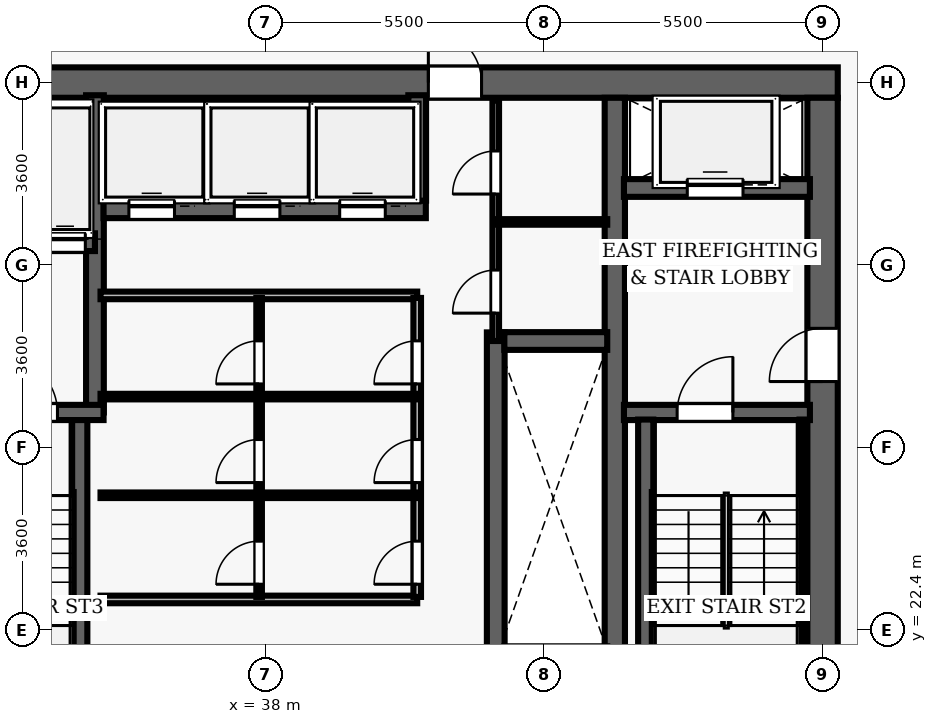
"""IFC4 building model, lengths in metres.
Left out: names, types, materials, properties, quantities, classifications, styles, units other than length and angle.
Written with IfcOpenShell. Run it as: python <this file> out.ifc"""

import sys

from ifc_helpers import new_model, si_unit, direction, frame, frame_2d, origin, place, context, subcontext, project, spatial, rectangle, extrude, element, fill, save


model = new_model("IFC4")
c1 = context("Model", 3, precision=1e-05, world=origin(), true_north=direction((0.0, 1.0)))
c2 = subcontext(c1, "Body", "Model", "MODEL_VIEW")
j1 = project(units=[si_unit("LENGTHUNIT", "METRE"), si_unit("PLANEANGLEUNIT", "RADIAN")], contexts=[c1])
p1 = place(None, origin())
s1 = spatial("IfcSite", under=j1, at=p1, CompositionType="ELEMENT")
p2 = place(p1, origin())
s2 = spatial("IfcBuilding", under=s1, at=p2, CompositionType="ELEMENT")
p3 = place(p2, frame((0.0, 0.0, 48.4)))
s3 = spatial("IfcBuildingStorey", under=s2, at=p3, CompositionType="ELEMENT", Elevation=48.4)
p4 = place(p3, frame((26.7, 33.2, 0.0), z_axis=(0.0, 0.0, 1.0), x_axis=(1.0, 0.0, 0.0)))
e1 = element("IfcWall", 1, at=p4, inside=s3, PredefinedType="SHEAR", context=c2, shape_type="SweptSolid", body=[
    extrude(rectangle(XDim=22.6, YDim=0.6, at=frame_2d((11.3, 0.0))), origin(), (0.0, 0.0, 1.0), 3.5),
])
p5 = place(p4, frame((4.62, 0.0, 0.0)))
e2 = element("IfcOpeningElement", 2, at=p5, cuts=e1, PredefinedType="OPENING", context=c2, shape_type="SweptSolid", body=[
    extrude(rectangle(XDim=1.05, YDim=2.15, at=frame_2d((0.525, 1.075))), frame((0.0, 0.31, 0.0), z_axis=(0.0, -1.0, 0.0), x_axis=(1.0, 0.0, 0.0)), (0.0, 0.0, 1.0), 0.62),
])
p6 = place(p4, frame((14.52, 0.0, 0.0)))
e3 = element("IfcOpeningElement", 3, at=p6, cuts=e1, PredefinedType="OPENING", context=c2, shape_type="SweptSolid", body=[
    extrude(rectangle(XDim=1.05, YDim=2.15, at=frame_2d((0.525, 1.075))), frame((0.0, 0.31, 0.0), z_axis=(0.0, -1.0, 0.0), x_axis=(1.0, 0.0, 0.0)), (0.0, 0.0, 1.0), 0.62),
])
p7 = place(p3, frame((49.0, 19.1, 0.0), z_axis=(0.0, 0.0, 1.0), x_axis=(0.0, 1.0, 0.0)))
e4 = element("IfcWall", 4, at=p7, inside=s3, PredefinedType="SHEAR", context=c2, shape_type="SweptSolid", body=[
    extrude(rectangle(XDim=13.8, YDim=0.6, at=frame_2d((6.9, 0.0))), origin(), (0.0, 0.0, 1.0), 3.5),
])
p8 = place(p7, frame((8.2, 0.0, 0.0)))
e5 = element("IfcOpeningElement", 5, at=p8, cuts=e4, PredefinedType="OPENING", context=c2, shape_type="SweptSolid", body=[
    extrude(rectangle(XDim=1.05, YDim=2.15, at=frame_2d((0.525, 1.075))), frame((0.0, 0.31, 0.0), z_axis=(0.0, -1.0, 0.0), x_axis=(1.0, 0.0, 0.0)), (0.0, 0.0, 1.0), 0.62),
])
p9 = place(p3, frame((44.9, 19.1, 0.0), z_axis=(0.0, 0.0, 1.0), x_axis=(0.0, 1.0, 0.0)))
e6 = element("IfcWall", 6, at=p9, inside=s3, PredefinedType="SHEAR", context=c2, shape_type="SweptSolid", body=[
    extrude(rectangle(XDim=13.8, YDim=0.4, at=frame_2d((6.9, 0.0))), origin(), (0.0, 0.0, 1.0), 3.5),
])
p10 = place(p3, frame((45.08, 26.69, 0.0), z_axis=(0.0, 0.0, 1.0), x_axis=(1.0, 0.0, 0.0)))
e7 = element("IfcWall", 7, at=p10, inside=s3, PredefinedType="SHEAR", context=c2, shape_type="SweptSolid", body=[
    extrude(rectangle(XDim=3.67, YDim=0.3, at=frame_2d((1.835, 0.0))), origin(), (0.0, 0.0, 1.0), 3.5),
])
p11 = place(p10, frame((1.05, 0.0, 0.0)))
e8 = element("IfcOpeningElement", 8, at=p11, cuts=e7, PredefinedType="OPENING", context=c2, shape_type="SweptSolid", body=[
    extrude(rectangle(XDim=1.1, YDim=2.15, at=frame_2d((0.55, 1.075))), frame((0.0, 0.16, 0.0), z_axis=(0.0, -1.0, 0.0), x_axis=(1.0, 0.0, 0.0)), (0.0, 0.0, 1.0), 0.32),
])
p12 = place(p3, frame((45.51, 19.05, 0.0), z_axis=(0.0, 0.0, 1.0), x_axis=(0.0, 1.0, 0.0)))
e9 = element("IfcWall", 9, at=p12, inside=s3, PredefinedType="SHEAR", context=c2, shape_type="SweptSolid", body=[
    extrude(rectangle(XDim=7.5, YDim=0.3, at=frame_2d((3.75, 0.0))), origin(), (0.0, 0.0, 1.0), 3.5),
])
p13 = place(p3, frame((48.605, 19.1, 0.0), z_axis=(0.0, 0.0, 1.0), x_axis=(0.0, 1.0, 0.0)))
e10 = element("IfcWall", 10, at=p13, inside=s3, PredefinedType="SHEAR", context=c2, shape_type="SweptSolid", body=[
    extrude(rectangle(XDim=7.45, YDim=0.12, at=frame_2d((3.725, 0.0))), origin(), (0.0, 0.0, 1.0), 3.5),
])
p14 = place(p3, frame((45.08, 31.12, 0.0), z_axis=(0.0, 0.0, 1.0), x_axis=(1.0, 0.0, 0.0)))
e11 = element("IfcWall", 11, at=p14, inside=s3, PredefinedType="SHEAR", context=c2, shape_type="SweptSolid", body=[
    extrude(rectangle(XDim=3.67, YDim=0.35, at=frame_2d((1.835, 0.0))), origin(), (0.0, 0.0, 1.0), 2.6),
])
p15 = place(p14, frame((1.25, 0.0, 0.0)))
e12 = element("IfcOpeningElement", 12, at=p15, cuts=e11, PredefinedType="OPENING", context=c2, shape_type="SweptSolid", body=[
    extrude(rectangle(XDim=1.1, YDim=2.15, at=frame_2d((0.55, 1.075))), frame((0.0, 0.185, 0.0), z_axis=(0.0, -1.0, 0.0), x_axis=(1.0, 0.0, 0.0)), (0.0, 0.0, 1.0), 0.37),
])
p16 = place(p3, frame((34.34, 19.05, 0.0), z_axis=(0.0, 0.0, 1.0), x_axis=(0.0, 1.0, 0.0)))
e13 = element("IfcWall", 13, at=p16, inside=s3, PredefinedType="SHEAR", context=c2, shape_type="SweptSolid", body=[
    extrude(rectangle(XDim=7.5, YDim=0.3, at=frame_2d((3.75, 0.0))), origin(), (0.0, 0.0, 1.0), 3.5),
])
p17 = place(p3, frame((34.64, 26.69, 0.0), z_axis=(0.0, 0.0, 1.0), x_axis=(0.0, 1.0, 0.0)))
e14 = element("IfcWall", 14, at=p17, inside=s3, PredefinedType="SHEAR", context=c2, shape_type="SweptSolid", body=[
    extrude(rectangle(XDim=6.26, YDim=0.35, at=frame_2d((3.13, 0.0))), origin(), (0.0, 0.0, 1.0), 3.5),
])
p18 = place(p3, frame((31.25, 26.69, 0.0), z_axis=(0.0, 0.0, 1.0), x_axis=(1.0, 0.0, 0.0)))
e15 = element("IfcWall", 15, at=p18, inside=s3, PredefinedType="SHEAR", context=c2, shape_type="SweptSolid", body=[
    extrude(rectangle(XDim=3.56, YDim=0.3, at=frame_2d((1.78, 0.0))), origin(), (0.0, 0.0, 1.0), 3.5),
])
p19 = place(p18, frame((1.55, 0.0, 0.0)))
e16 = element("IfcOpeningElement", 16, at=p19, cuts=e15, PredefinedType="OPENING", context=c2, shape_type="SweptSolid", body=[
    extrude(rectangle(XDim=1.1, YDim=2.15, at=frame_2d((0.55, 1.075))), frame((0.0, 0.16, 0.0), z_axis=(0.0, -1.0, 0.0), x_axis=(1.0, 0.0, 0.0)), (0.0, 0.0, 1.0), 0.32),
])
p20 = place(p3, frame((32.23, 30.05, 0.0), z_axis=(0.0, 0.0, 1.0), x_axis=(1.0, 0.0, 0.0)))
e17 = element("IfcWall", 17, at=p20, inside=s3, PredefinedType="SHEAR", context=c2, shape_type="SweptSolid", body=[
    extrude(rectangle(XDim=2.41, YDim=0.35, at=frame_2d((1.205, 0.0))), origin(), (0.0, 0.0, 1.0), 2.6),
])
p21 = place(p20, frame((0.42, 0.0, 0.0)))
e18 = element("IfcOpeningElement", 18, at=p21, cuts=e17, PredefinedType="OPENING", context=c2, shape_type="SweptSolid", body=[
    extrude(rectangle(XDim=0.8, YDim=2.15, at=frame_2d((0.4, 1.075))), frame((0.0, 0.185, 0.0), z_axis=(0.0, -1.0, 0.0), x_axis=(1.0, 0.0, 0.0)), (0.0, 0.0, 1.0), 0.37),
])
p22 = place(p20, frame((1.42, 0.0, 0.0)))
e19 = element("IfcOpeningElement", 19, at=p22, cuts=e17, PredefinedType="OPENING", context=c2, shape_type="SweptSolid", body=[
    extrude(rectangle(XDim=0.8, YDim=2.15, at=frame_2d((0.4, 1.075))), frame((0.0, 0.185, 0.0), z_axis=(0.0, -1.0, 0.0), x_axis=(1.0, 0.0, 0.0)), (0.0, 0.0, 1.0), 0.37),
])
p23 = place(p3, frame((42.55, 21.73, 0.0), z_axis=(0.0, 0.0, 1.0), x_axis=(0.0, 1.0, 0.0)))
e20 = element("IfcWall", 20, at=p23, inside=s3, PredefinedType="SHEAR", context=c2, shape_type="SweptSolid", body=[
    extrude(rectangle(XDim=6.54, YDim=0.35, at=frame_2d((3.27, 0.0))), origin(), (0.0, 0.0, 1.0), 2.6),
])
p24 = place(p3, frame((42.72, 28.1, 0.0), z_axis=(0.0, 0.0, 1.0), x_axis=(1.0, 0.0, 0.0)))
e21 = element("IfcWall", 21, at=p24, inside=s3, PredefinedType="SHEAR", context=c2, shape_type="SweptSolid", body=[
    extrude(rectangle(XDim=2.03, YDim=0.35, at=frame_2d((1.015, 0.0))), origin(), (0.0, 0.0, 1.0), 2.6),
])
p25 = place(p3, frame((34.81, 30.7, 0.0), z_axis=(0.0, 0.0, 1.0), x_axis=(1.0, 0.0, 0.0)))
e22 = element("IfcWall", 22, at=p25, inside=s3, PredefinedType="SHEAR", context=c2, shape_type="SweptSolid", body=[
    extrude(rectangle(XDim=6.36, YDim=0.35, at=frame_2d((3.18, 0.0))), origin(), (0.0, 0.0, 1.0), 2.6),
])
p26 = place(p25, frame((0.5, 0.0, 0.0)))
e23 = element("IfcOpeningElement", 23, at=p26, cuts=e22, PredefinedType="OPENING", context=c2, shape_type="SweptSolid", body=[
    extrude(rectangle(XDim=0.9, YDim=2.15, at=frame_2d((0.45, 1.075))), frame((0.0, 0.185, 0.0), z_axis=(0.0, -1.0, 0.0), x_axis=(1.0, 0.0, 0.0)), (0.0, 0.0, 1.0), 0.37),
])
p27 = place(p25, frame((2.58, 0.0, 0.0)))
e24 = element("IfcOpeningElement", 24, at=p27, cuts=e22, PredefinedType="OPENING", context=c2, shape_type="SweptSolid", body=[
    extrude(rectangle(XDim=0.9, YDim=2.15, at=frame_2d((0.45, 1.075))), frame((0.0, 0.185, 0.0), z_axis=(0.0, -1.0, 0.0), x_axis=(1.0, 0.0, 0.0)), (0.0, 0.0, 1.0), 0.37),
])
p28 = place(p25, frame((4.66, 0.0, 0.0)))
e25 = element("IfcOpeningElement", 25, at=p28, cuts=e22, PredefinedType="OPENING", context=c2, shape_type="SweptSolid", body=[
    extrude(rectangle(XDim=0.9, YDim=2.15, at=frame_2d((0.45, 1.075))), frame((0.0, 0.185, 0.0), z_axis=(0.0, -1.0, 0.0), x_axis=(1.0, 0.0, 0.0)), (0.0, 0.0, 1.0), 0.37),
])
p29 = place(p3, frame((41.0, 30.87, 0.0), z_axis=(0.0, 0.0, 1.0), x_axis=(0.0, 1.0, 0.0)))
e26 = element("IfcWall", 26, at=p29, inside=s3, PredefinedType="SHEAR", context=c2, shape_type="SweptSolid", body=[
    extrude(rectangle(XDim=2.08, YDim=0.35, at=frame_2d((1.04, 0.0))), origin(), (0.0, 0.0, 1.0), 2.6),
])
for number, where, z_axis, x_axis in (
    (27, (34.75, 29.0, 0.0), (0.0, 0.0, 1.0), (1.0, 0.0, 0.0)),
    (28, (34.75, 23.0, 0.0), (0.0, 0.0, 1.0), (1.0, 0.0, 0.0)),
):
    element("IfcWall", number, at=place(p3, frame(where, z_axis=z_axis, x_axis=x_axis)), inside=s3, PredefinedType="PARTITIONING", context=c2, shape_type="SweptSolid", body=[
        extrude(rectangle(XDim=6.25, YDim=0.15, at=frame_2d((3.125, 0.0))), origin(), (0.0, 0.0, 1.0), 2.6),
    ])
p30 = place(p3, frame((41.0, 23.05, 0.0), z_axis=(0.0, 0.0, 1.0), x_axis=(0.0, 1.0, 0.0)))
e29 = element("IfcWall", 29, at=p30, inside=s3, PredefinedType="PARTITIONING", context=c2, shape_type="SweptSolid", body=[
    extrude(rectangle(XDim=5.9, YDim=0.15, at=frame_2d((2.95, 0.0))), origin(), (0.0, 0.0, 1.0), 2.6),
])
p31 = place(p30, frame((0.25, 0.0, 0.0)))
e30 = element("IfcOpeningElement", 30, at=p31, cuts=e29, PredefinedType="OPENING", context=c2, shape_type="SweptSolid", body=[
    extrude(rectangle(XDim=0.85, YDim=2.1, at=frame_2d((0.425, 1.05))), frame((0.0, 0.085, 0.0), z_axis=(0.0, -1.0, 0.0), x_axis=(1.0, 0.0, 0.0)), (0.0, 0.0, 1.0), 0.17),
])
p32 = place(p30, frame((2.256, 0.0, 0.0)))
e31 = element("IfcOpeningElement", 31, at=p32, cuts=e29, PredefinedType="OPENING", context=c2, shape_type="SweptSolid", body=[
    extrude(rectangle(XDim=0.85, YDim=2.1, at=frame_2d((0.425, 1.05))), frame((0.0, 0.085, 0.0), z_axis=(0.0, -1.0, 0.0), x_axis=(1.0, 0.0, 0.0)), (0.0, 0.0, 1.0), 0.17),
])
p33 = place(p30, frame((4.203, 0.0, 0.0)))
e32 = element("IfcOpeningElement", 32, at=p33, cuts=e29, PredefinedType="OPENING", context=c2, shape_type="SweptSolid", body=[
    extrude(rectangle(XDim=0.85, YDim=2.1, at=frame_2d((0.425, 1.05))), frame((0.0, 0.085, 0.0), z_axis=(0.0, -1.0, 0.0), x_axis=(1.0, 0.0, 0.0)), (0.0, 0.0, 1.0), 0.17),
])
p34 = place(p3, frame((37.88, 23.05, 0.0), z_axis=(0.0, 0.0, 1.0), x_axis=(0.0, 1.0, 0.0)))
e33 = element("IfcWall", 33, at=p34, inside=s3, PredefinedType="PARTITIONING", context=c2, shape_type="SweptSolid", body=[
    extrude(rectangle(XDim=5.9, YDim=0.11, at=frame_2d((2.95, 0.0))), origin(), (0.0, 0.0, 1.0), 2.6),
])
p35 = place(p34, frame((0.25, 0.0, 0.0)))
e34 = element("IfcOpeningElement", 34, at=p35, cuts=e33, PredefinedType="OPENING", context=c2, shape_type="SweptSolid", body=[
    extrude(rectangle(XDim=0.85, YDim=2.1, at=frame_2d((0.425, 1.05))), frame((0.0, 0.065, 0.0), z_axis=(0.0, -1.0, 0.0), x_axis=(1.0, 0.0, 0.0)), (0.0, 0.0, 1.0), 0.13),
])
p36 = place(p34, frame((2.256, 0.0, 0.0)))
e35 = element("IfcOpeningElement", 35, at=p36, cuts=e33, PredefinedType="OPENING", context=c2, shape_type="SweptSolid", body=[
    extrude(rectangle(XDim=0.85, YDim=2.1, at=frame_2d((0.425, 1.05))), frame((0.0, 0.065, 0.0), z_axis=(0.0, -1.0, 0.0), x_axis=(1.0, 0.0, 0.0)), (0.0, 0.0, 1.0), 0.13),
])
p37 = place(p34, frame((4.203, 0.0, 0.0)))
e36 = element("IfcOpeningElement", 36, at=p37, cuts=e33, PredefinedType="OPENING", context=c2, shape_type="SweptSolid", body=[
    extrude(rectangle(XDim=0.85, YDim=2.1, at=frame_2d((0.425, 1.05))), frame((0.0, 0.065, 0.0), z_axis=(0.0, -1.0, 0.0), x_axis=(1.0, 0.0, 0.0)), (0.0, 0.0, 1.0), 0.13),
])
for number, where, z_axis, x_axis in (
    (37, (34.75, 25.056, 0.0), (0.0, 0.0, 1.0), (1.0, 0.0, 0.0)),
    (38, (34.75, 27.003, 0.0), (0.0, 0.0, 1.0), (1.0, 0.0, 0.0)),
):
    element("IfcWall", number, at=place(p3, frame(where, z_axis=z_axis, x_axis=x_axis)), inside=s3, PredefinedType="PARTITIONING", context=c2, shape_type="SweptSolid", body=[
        extrude(rectangle(XDim=6.25, YDim=0.11, at=frame_2d((3.125, 0.0))), origin(), (0.0, 0.0, 1.0), 2.6),
    ])
p38 = place(p3, frame((42.55, 28.1, 0.0), z_axis=(0.0, 0.0, 1.0), x_axis=(0.0, 1.0, 0.0)))
e39 = element("IfcWall", 39, at=p38, inside=s3, PredefinedType="PARTITIONING", context=c2, shape_type="SweptSolid", body=[
    extrude(rectangle(XDim=4.75, YDim=0.13, at=frame_2d((2.375, 0.0))), origin(), (0.0, 0.0, 1.0), 2.6),
])
p39 = place(p38, frame((0.55, 0.0, 0.0)))
e40 = element("IfcOpeningElement", 40, at=p39, cuts=e39, PredefinedType="OPENING", context=c2, shape_type="SweptSolid", body=[
    extrude(rectangle(XDim=0.85, YDim=2.1, at=frame_2d((0.425, 1.05))), frame((0.0, 0.075, 0.0), z_axis=(0.0, -1.0, 0.0), x_axis=(1.0, 0.0, 0.0)), (0.0, 0.0, 1.0), 0.15),
])
p40 = place(p38, frame((2.9, 0.0, 0.0)))
e41 = element("IfcOpeningElement", 41, at=p40, cuts=e39, PredefinedType="OPENING", context=c2, shape_type="SweptSolid", body=[
    extrude(rectangle(XDim=0.85, YDim=2.1, at=frame_2d((0.425, 1.05))), frame((0.0, 0.075, 0.0), z_axis=(0.0, -1.0, 0.0), x_axis=(1.0, 0.0, 0.0)), (0.0, 0.0, 1.0), 0.15),
])
p41 = place(p3, frame((42.55, 30.45, 0.0), z_axis=(0.0, 0.0, 1.0), x_axis=(1.0, 0.0, 0.0)))
e42 = element("IfcWall", 42, at=p41, inside=s3, PredefinedType="PARTITIONING", context=c2, shape_type="SweptSolid", body=[
    extrude(rectangle(XDim=2.2, YDim=0.11, at=frame_2d((1.1, 0.0))), origin(), (0.0, 0.0, 1.0), 2.6),
])
p42 = place(p11, origin())
e43 = element("IfcDoor", 43, at=p42, inside=s3, OperationType="SINGLE_SWING_RIGHT", PredefinedType="DOOR", context=c2, shape_type="SweptSolid", body=[
    extrude(rectangle(XDim=1.1, YDim=2.15, at=frame_2d((0.55, 1.075))), frame((0.0, 0.025, 0.0), z_axis=(0.0, -1.0, 0.0), x_axis=(1.0, 0.0, 0.0)), (0.0, 0.0, 1.0), 0.05),
])
fill(e8, e43)
p43 = place(p8, origin())
e44 = element("IfcDoor", 44, at=p43, inside=s3, OperationType="SINGLE_SWING_LEFT", PredefinedType="DOOR", context=c2, shape_type="SweptSolid", body=[
    extrude(rectangle(XDim=1.05, YDim=2.15, at=frame_2d((0.525, 1.075))), frame((0.0, 0.025, 0.0), z_axis=(0.0, -1.0, 0.0), x_axis=(1.0, 0.0, 0.0)), (0.0, 0.0, 1.0), 0.05),
])
fill(e5, e44)
p44 = place(p19, origin())
e45 = element("IfcDoor", 45, at=p44, inside=s3, OperationType="SINGLE_SWING_LEFT", PredefinedType="DOOR", context=c2, shape_type="SweptSolid", body=[
    extrude(rectangle(XDim=1.1, YDim=2.15, at=frame_2d((0.55, 1.075))), frame((0.0, 0.025, 0.0), z_axis=(0.0, -1.0, 0.0), x_axis=(1.0, 0.0, 0.0)), (0.0, 0.0, 1.0), 0.05),
])
fill(e16, e45)
p45 = place(p6, origin())
e46 = element("IfcDoor", 46, at=p45, inside=s3, OperationType="SINGLE_SWING_LEFT", PredefinedType="DOOR", context=c2, shape_type="SweptSolid", body=[
    extrude(rectangle(XDim=1.05, YDim=2.15, at=frame_2d((0.525, 1.075))), frame((0.0, 0.025, 0.0), z_axis=(0.0, -1.0, 0.0), x_axis=(1.0, 0.0, 0.0)), (0.0, 0.0, 1.0), 0.05),
])
fill(e3, e46)
p46 = place(p31, origin())
e47 = element("IfcDoor", 47, at=p46, inside=s3, OperationType="SINGLE_SWING_LEFT", PredefinedType="DOOR", context=c2, shape_type="SweptSolid", body=[
    extrude(rectangle(XDim=0.85, YDim=2.1, at=frame_2d((0.425, 1.05))), frame((0.0, 0.025, 0.0), z_axis=(0.0, -1.0, 0.0), x_axis=(1.0, 0.0, 0.0)), (0.0, 0.0, 1.0), 0.05),
])
fill(e30, e47)
p47 = place(p35, origin())
e48 = element("IfcDoor", 48, at=p47, inside=s3, OperationType="SINGLE_SWING_LEFT", PredefinedType="DOOR", context=c2, shape_type="SweptSolid", body=[
    extrude(rectangle(XDim=0.85, YDim=2.1, at=frame_2d((0.425, 1.05))), frame((0.0, 0.025, 0.0), z_axis=(0.0, -1.0, 0.0), x_axis=(1.0, 0.0, 0.0)), (0.0, 0.0, 1.0), 0.05),
])
fill(e34, e48)
p48 = place(p32, origin())
e49 = element("IfcDoor", 49, at=p48, inside=s3, OperationType="SINGLE_SWING_LEFT", PredefinedType="DOOR", context=c2, shape_type="SweptSolid", body=[
    extrude(rectangle(XDim=0.85, YDim=2.1, at=frame_2d((0.425, 1.05))), frame((0.0, 0.025, 0.0), z_axis=(0.0, -1.0, 0.0), x_axis=(1.0, 0.0, 0.0)), (0.0, 0.0, 1.0), 0.05),
])
fill(e31, e49)
p49 = place(p36, origin())
e50 = element("IfcDoor", 50, at=p49, inside=s3, OperationType="SINGLE_SWING_LEFT", PredefinedType="DOOR", context=c2, shape_type="SweptSolid", body=[
    extrude(rectangle(XDim=0.85, YDim=2.1, at=frame_2d((0.425, 1.05))), frame((0.0, 0.025, 0.0), z_axis=(0.0, -1.0, 0.0), x_axis=(1.0, 0.0, 0.0)), (0.0, 0.0, 1.0), 0.05),
])
fill(e35, e50)
p50 = place(p33, origin())
e51 = element("IfcDoor", 51, at=p50, inside=s3, OperationType="SINGLE_SWING_LEFT", PredefinedType="DOOR", context=c2, shape_type="SweptSolid", body=[
    extrude(rectangle(XDim=0.85, YDim=2.1, at=frame_2d((0.425, 1.05))), frame((0.0, 0.025, 0.0), z_axis=(0.0, -1.0, 0.0), x_axis=(1.0, 0.0, 0.0)), (0.0, 0.0, 1.0), 0.05),
])
fill(e32, e51)
p51 = place(p37, origin())
e52 = element("IfcDoor", 52, at=p51, inside=s3, OperationType="SINGLE_SWING_LEFT", PredefinedType="DOOR", context=c2, shape_type="SweptSolid", body=[
    extrude(rectangle(XDim=0.85, YDim=2.1, at=frame_2d((0.425, 1.05))), frame((0.0, 0.025, 0.0), z_axis=(0.0, -1.0, 0.0), x_axis=(1.0, 0.0, 0.0)), (0.0, 0.0, 1.0), 0.05),
])
fill(e36, e52)
p52 = place(p39, origin())
e53 = element("IfcDoor", 53, at=p52, inside=s3, OperationType="SINGLE_SWING_LEFT", PredefinedType="DOOR", context=c2, shape_type="SweptSolid", body=[
    extrude(rectangle(XDim=0.85, YDim=2.1, at=frame_2d((0.425, 1.05))), frame((0.0, 0.025, 0.0), z_axis=(0.0, -1.0, 0.0), x_axis=(1.0, 0.0, 0.0)), (0.0, 0.0, 1.0), 0.05),
])
fill(e40, e53)
p53 = place(p40, origin())
e54 = element("IfcDoor", 54, at=p53, inside=s3, OperationType="SINGLE_SWING_LEFT", PredefinedType="DOOR", context=c2, shape_type="SweptSolid", body=[
    extrude(rectangle(XDim=0.85, YDim=2.1, at=frame_2d((0.425, 1.05))), frame((0.0, 0.025, 0.0), z_axis=(0.0, -1.0, 0.0), x_axis=(1.0, 0.0, 0.0)), (0.0, 0.0, 1.0), 0.05),
])
fill(e41, e54)
p54 = place(p26, origin())
e55 = element("IfcDoor", 55, at=p54, inside=s3, OperationType="SLIDING_TO_LEFT", PredefinedType="DOOR", context=c2, shape_type="SweptSolid", body=[
    extrude(rectangle(XDim=0.9, YDim=2.15, at=frame_2d((0.45, 1.075))), frame((0.0, 0.025, 0.0), z_axis=(0.0, -1.0, 0.0), x_axis=(1.0, 0.0, 0.0)), (0.0, 0.0, 1.0), 0.05),
])
fill(e23, e55)
p55 = place(p27, origin())
e56 = element("IfcDoor", 56, at=p55, inside=s3, OperationType="SLIDING_TO_LEFT", PredefinedType="DOOR", context=c2, shape_type="SweptSolid", body=[
    extrude(rectangle(XDim=0.9, YDim=2.15, at=frame_2d((0.45, 1.075))), frame((0.0, 0.025, 0.0), z_axis=(0.0, -1.0, 0.0), x_axis=(1.0, 0.0, 0.0)), (0.0, 0.0, 1.0), 0.05),
])
fill(e24, e56)
p56 = place(p28, origin())
e57 = element("IfcDoor", 57, at=p56, inside=s3, OperationType="SLIDING_TO_LEFT", PredefinedType="DOOR", context=c2, shape_type="SweptSolid", body=[
    extrude(rectangle(XDim=0.9, YDim=2.15, at=frame_2d((0.45, 1.075))), frame((0.0, 0.025, 0.0), z_axis=(0.0, -1.0, 0.0), x_axis=(1.0, 0.0, 0.0)), (0.0, 0.0, 1.0), 0.05),
])
fill(e25, e57)
p57 = place(p15, origin())
e58 = element("IfcDoor", 58, at=p57, inside=s3, OperationType="SLIDING_TO_LEFT", PredefinedType="DOOR", context=c2, shape_type="SweptSolid", body=[
    extrude(rectangle(XDim=1.1, YDim=2.15, at=frame_2d((0.55, 1.075))), frame((0.0, 0.025, 0.0), z_axis=(0.0, -1.0, 0.0), x_axis=(1.0, 0.0, 0.0)), (0.0, 0.0, 1.0), 0.05),
])
fill(e12, e58)
p58 = place(p22, origin())
e59 = element("IfcDoor", 59, at=p58, inside=s3, OperationType="SLIDING_TO_LEFT", PredefinedType="DOOR", context=c2, shape_type="SweptSolid", body=[
    extrude(rectangle(XDim=0.8, YDim=2.15, at=frame_2d((0.4, 1.075))), frame((0.0, 0.025, 0.0), z_axis=(0.0, -1.0, 0.0), x_axis=(1.0, 0.0, 0.0)), (0.0, 0.0, 1.0), 0.05),
])
fill(e19, e59)
save(model, sys.argv[1])
